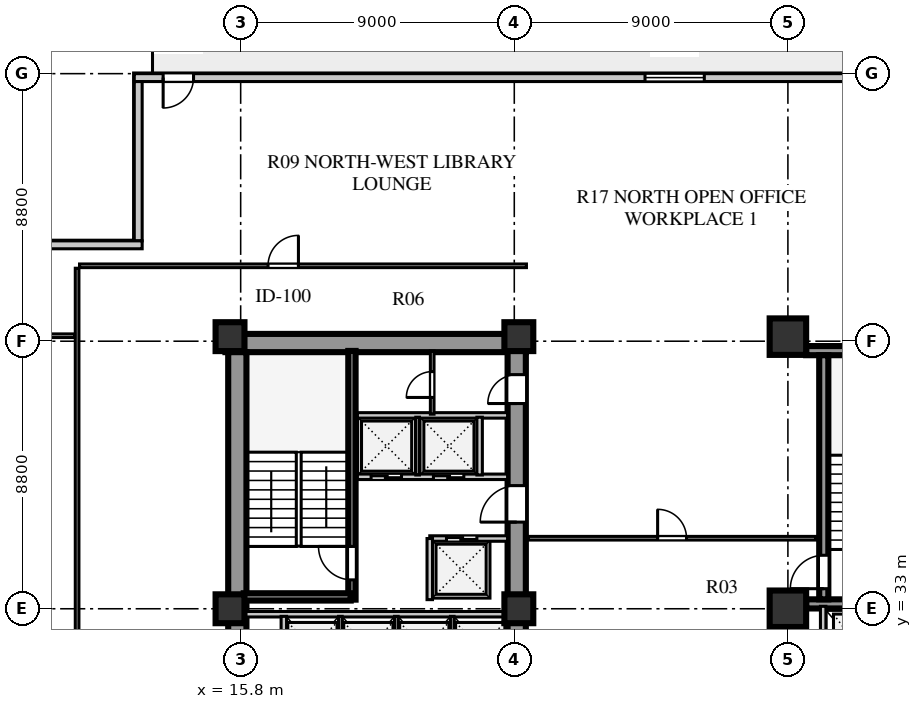
"""IFC4 building model, lengths in metres.
Left out: names, types, materials, properties, quantities, classifications, styles, units other than length and angle.
Written with IfcOpenShell. Run it as: python <this file> out.ifc"""

import sys

from ifc_helpers import new_model, si_unit, direction, frame, frame_2d, origin, origin_2d, place, context, subcontext, project, spatial, rectangle, extrude, element, fill, save


model = new_model("IFC4")
c1 = context("Model", 3, precision=1e-05, world=origin(), true_north=direction((0.0, 1.0)))
c2 = subcontext(c1, "Body", "Model", "MODEL_VIEW")
j1 = project(units=[si_unit("LENGTHUNIT", "METRE"), si_unit("PLANEANGLEUNIT", "RADIAN")], contexts=[c1])
p1 = place(None, origin())
s1 = spatial("IfcSite", under=j1, at=p1, CompositionType="ELEMENT")
p2 = place(p1, origin())
s2 = spatial("IfcBuilding", under=s1, at=p2, CompositionType="ELEMENT")
p3 = place(p2, frame((0.0, 0.0, 34.0)))
s3 = spatial("IfcBuildingStorey", under=s2, at=p3, CompositionType="ELEMENT", Elevation=34.0)
p4 = place(p3, frame((15.3, 41.74, 0.0), z_axis=(0.0, 0.0, 1.0), x_axis=(1.0, 0.0, 0.0)))
e1 = element("IfcWall", 1, at=p4, inside=s3, PredefinedType="SHEAR", context=c2, shape_type="SweptSolid", body=[
    extrude(rectangle(XDim=9.88, YDim=0.6, at=frame_2d((4.94, 0.0))), origin(), (0.0, 0.0, 1.0), 3.72),
])
p5 = place(p3, frame((15.69, 15.81, 0.0), z_axis=(0.0, 0.0, 1.0), x_axis=(0.0, 1.0, 0.0)))
e2 = element("IfcWall", 2, at=p5, inside=s3, PredefinedType="SHEAR", context=c2, shape_type="SweptSolid", body=[
    extrude(rectangle(XDim=25.63, YDim=0.6, at=frame_2d((12.815, 0.0))), origin(), (0.0, 0.0, 1.0), 3.72),
])
p6 = place(p3, frame((24.88, 15.74, 0.0), z_axis=(0.0, 0.0, 1.0), x_axis=(0.0, 1.0, 0.0)))
e3 = element("IfcWall", 3, at=p6, inside=s3, PredefinedType="SHEAR", context=c2, shape_type="SweptSolid", body=[
    extrude(rectangle(XDim=25.76, YDim=0.6, at=frame_2d((12.88, 0.0))), origin(), (0.0, 0.0, 1.0), 3.72),
])
p7 = place(p6, frame((1.61, 0.0, 0.0)))
e4 = element("IfcOpeningElement", 4, at=p7, cuts=e3, PredefinedType="OPENING", context=c2, shape_type="SweptSolid", body=[
    extrude(rectangle(XDim=1.2, YDim=2.1, at=frame_2d((0.6, 1.05))), frame((0.0, 0.31, 0.0), z_axis=(0.0, -1.0, 0.0), x_axis=(1.0, 0.0, 0.0)), (0.0, 0.0, 1.0), 0.62),
])
p8 = place(p6, frame((6.78, 0.0, 0.0)))
e5 = element("IfcOpeningElement", 5, at=p8, cuts=e3, PredefinedType="OPENING", context=c2, shape_type="SweptSolid", body=[
    extrude(rectangle(XDim=0.85, YDim=2.06, at=frame_2d((0.425, 1.03))), frame((0.0, 0.31, 0.0), z_axis=(0.0, -1.0, 0.0), x_axis=(1.0, 0.0, 0.0)), (0.0, 0.0, 1.0), 0.62),
])
p9 = place(p6, frame((12.11, 0.0, 0.0)))
e6 = element("IfcOpeningElement", 6, at=p9, cuts=e3, PredefinedType="OPENING", context=c2, shape_type="SweptSolid", body=[
    extrude(rectangle(XDim=1.5, YDim=2.12, at=frame_2d((0.75, 1.06))), frame((0.0, 0.31, 0.0), z_axis=(0.0, -1.0, 0.0), x_axis=(1.0, 0.0, 0.0)), (0.0, 0.0, 1.0), 0.62),
])
p10 = place(p6, frame((20.11, 0.0, 0.0)))
e7 = element("IfcOpeningElement", 7, at=p10, cuts=e3, PredefinedType="OPENING", context=c2, shape_type="SweptSolid", body=[
    extrude(rectangle(XDim=1.2, YDim=2.12, at=frame_2d((0.6, 1.06))), frame((0.0, 0.31, 0.0), z_axis=(0.0, -1.0, 0.0), x_axis=(1.0, 0.0, 0.0)), (0.0, 0.0, 1.0), 0.62),
])
p11 = place(p6, frame((24.01, 0.0, 0.0)))
e8 = element("IfcOpeningElement", 8, at=p11, cuts=e3, PredefinedType="OPENING", context=c2, shape_type="SweptSolid", body=[
    extrude(rectangle(XDim=0.95, YDim=2.1, at=frame_2d((0.475, 1.05))), frame((0.0, 0.31, 0.0), z_axis=(0.0, -1.0, 0.0), x_axis=(1.0, 0.0, 0.0)), (0.0, 0.0, 1.0), 0.62),
])
for number, where, z_axis, x_axis in (
    (9, (34.4, 33.16, 0.0), (0.0, 0.0, 1.0), (1.0, 0.0, 0.0)),
    (10, (34.4, 41.49, 0.0), (0.0, 0.0, 1.0), (1.0, 0.0, 0.0)),
):
    element("IfcWall", number, at=place(p3, frame(where, z_axis=z_axis, x_axis=x_axis)), inside=s3, PredefinedType="SHEAR", context=c2, shape_type="SweptSolid", body=[
        extrude(rectangle(XDim=4.47, YDim=0.3, at=frame_2d((2.235, 0.0))), origin(), (0.0, 0.0, 1.0), 3.72),
    ])
p12 = place(p3, frame((34.98, 33.31, 0.0), z_axis=(0.0, 0.0, 1.0), x_axis=(0.0, 1.0, 0.0)))
e11 = element("IfcWall", 11, at=p12, inside=s3, PredefinedType="SHEAR", context=c2, shape_type="SweptSolid", body=[
    extrude(rectangle(XDim=8.03, YDim=0.3, at=frame_2d((4.015, 0.0))), origin(), (0.0, 0.0, 1.0), 3.72),
])
p13 = place(p12, frame((0.35, 0.0, 0.0)))
e12 = element("IfcOpeningElement", 12, at=p13, cuts=e11, PredefinedType="OPENING", context=c2, shape_type="SweptSolid", body=[
    extrude(rectangle(XDim=1.1, YDim=2.1, at=frame_2d((0.55, 1.05))), frame((0.0, 0.16, 0.0), z_axis=(0.0, -1.0, 0.0), x_axis=(1.0, 0.0, 0.0)), (0.0, 0.0, 1.0), 0.32),
])
for number, where, z_axis, x_axis in (
    (13, (15.45, 33.0, 0.0), (0.0, 0.0, 1.0), (1.0, 0.0, 0.0)),
    (14, (15.45, 41.95, 0.0), (0.0, 0.0, 1.0), (1.0, 0.0, 0.0)),
    (15, (24.95, 33.0, 0.0), (0.0, 0.0, 1.0), (1.0, 0.0, 0.0)),
    (16, (24.95, 41.95, 0.0), (0.0, 0.0, 1.0), (1.0, 0.0, 0.0)),
):
    element("IfcColumn", number, at=place(p3, frame(where, z_axis=z_axis, x_axis=x_axis)), inside=s3, PredefinedType="COLUMN", context=c2, shape_type="SweptSolid", body=[
        extrude(rectangle(XDim=0.95, YDim=0.95, at=origin_2d()), origin(), (0.0, 0.0, 1.0), 3.72),
    ])
for number, where, z_axis, x_axis in (
    (17, (33.8, 33.0, 0.0), (0.0, 0.0, 1.0), (1.0, 0.0, 0.0)),
    (18, (33.8, 41.95, 0.0), (0.0, 0.0, 1.0), (1.0, 0.0, 0.0)),
):
    element("IfcColumn", number, at=place(p3, frame(where, z_axis=z_axis, x_axis=x_axis)), inside=s3, PredefinedType="COLUMN", context=c2, shape_type="SweptSolid", body=[
        extrude(rectangle(XDim=1.2, YDim=1.2, at=origin_2d()), origin(), (0.0, 0.0, 1.0), 3.72),
    ])
p14 = place(p3, frame((46.3, 50.47, 0.0), z_axis=(0.0, 0.0, 1.0), x_axis=(-1.0, 0.0, 0.0)))
e19 = element("IfcWall", 19, at=p14, inside=s3, PredefinedType="SOLIDWALL", context=c2, shape_type="SweptSolid", body=[
    extrude(rectangle(XDim=34.0, YDim=0.26, at=frame_2d((17.0, 0.0))), origin(), (0.0, 0.0, 1.0), 3.72),
])
p15 = place(p14, frame((32.05, 0.0, 0.0)))
e20 = element("IfcOpeningElement", 20, at=p15, cuts=e19, PredefinedType="OPENING", context=c2, shape_type="SweptSolid", body=[
    extrude(rectangle(XDim=1.0, YDim=2.05, at=frame_2d((0.5, 1.025))), frame((0.0, 0.14, 0.0), z_axis=(0.0, -1.0, 0.0), x_axis=(1.0, 0.0, 0.0)), (0.0, 0.0, 1.0), 0.28),
])
p16 = place(p14, frame((15.25, 0.0, 0.8)))
e21 = element("IfcOpeningElement", 21, at=p16, cuts=e19, PredefinedType="OPENING", context=c2, shape_type="SweptSolid", body=[
    extrude(rectangle(XDim=1.95, YDim=2.0, at=frame_2d((0.975, 1.0))), frame((0.0, 0.14, 0.0), z_axis=(0.0, -1.0, 0.0), x_axis=(1.0, 0.0, 0.0)), (0.0, 0.0, 1.0), 0.28),
])
p17 = place(p3, frame((12.43, 50.34, 0.0), z_axis=(0.0, 0.0, 1.0), x_axis=(0.0, -1.0, 0.0)))
e22 = element("IfcWall", 22, at=p17, inside=s3, PredefinedType="SOLIDWALL", context=c2, shape_type="SweptSolid", body=[
    extrude(rectangle(XDim=5.24, YDim=0.26, at=frame_2d((2.62, 0.0))), origin(), (0.0, 0.0, 1.0), 3.72),
])
p18 = place(p3, frame((12.56, 44.97, 0.0), z_axis=(0.0, 0.0, 1.0), x_axis=(-1.0, 0.0, 0.0)))
e23 = element("IfcWall", 23, at=p18, inside=s3, PredefinedType="SOLIDWALL", context=c2, shape_type="SweptSolid", body=[
    extrude(rectangle(XDim=5.76, YDim=0.26, at=frame_2d((2.88, 0.0))), origin(), (0.0, 0.0, 1.0), 3.72),
])
p19 = place(p3, frame((15.9, 32.82, 0.0), z_axis=(0.0, 0.0, 1.0), x_axis=(1.0, 0.0, 0.0)))
e24 = element("IfcWall", 24, at=p19, inside=s3, PredefinedType="SOLIDWALL", context=c2, shape_type="SweptSolid", body=[
    extrude(rectangle(XDim=8.68, YDim=0.18, at=frame_2d((4.34, 0.0))), origin(), (0.0, 0.0, 1.0), 3.02),
])
p20 = place(p3, frame((17.22, 30.7, 0.0), z_axis=(0.0, 0.0, 1.0), x_axis=(0.0, 1.0, 0.0)))
e25 = element("IfcWall", 25, at=p20, inside=s3, PredefinedType="SOLIDWALL", context=c2, shape_type="SweptSolid", body=[
    extrude(rectangle(XDim=2.05, YDim=0.18, at=frame_2d((1.025, 0.0))), origin(), (0.0, 0.0, 1.0), 3.72),
])
for number, where, z_axis, x_axis in (
    (26, (19.08, 30.7, 0.0), (0.0, 0.0, 1.0), (0.0, 1.0, 0.0)),
    (27, (20.92, 30.7, 0.0), (0.0, 0.0, 1.0), (0.0, 1.0, 0.0)),
    (28, (22.76, 30.7, 0.0), (0.0, 0.0, 1.0), (0.0, 1.0, 0.0)),
):
    element("IfcWall", number, at=place(p3, frame(where, z_axis=z_axis, x_axis=x_axis)), inside=s3, PredefinedType="PARTITIONING", context=c2, shape_type="SweptSolid", body=[
        extrude(rectangle(XDim=2.05, YDim=0.12, at=frame_2d((1.025, 0.0))), origin(), (0.0, 0.0, 1.0), 3.72),
    ])
p21 = place(p3, frame((19.46, 33.3, 0.0), z_axis=(0.0, 0.0, 1.0), x_axis=(0.0, 1.0, 0.0)))
e29 = element("IfcWall", 29, at=p21, inside=s3, PredefinedType="SHEAR", context=c2, shape_type="SweptSolid", body=[
    extrude(rectangle(XDim=8.18, YDim=0.24, at=frame_2d((4.09, 0.0))), origin(), (0.0, 0.0, 1.0), 4.0),
])
p22 = place(p21, frame((0.65, 0.0, 0.0)))
e30 = element("IfcOpeningElement", 30, at=p22, cuts=e29, PredefinedType="OPENING", context=c2, shape_type="SweptSolid", body=[
    extrude(rectangle(XDim=1.1, YDim=2.1, at=frame_2d((0.55, 1.05))), frame((0.0, 0.13, 0.0), z_axis=(0.0, -1.0, 0.0), x_axis=(1.0, 0.0, 0.0)), (0.0, 0.0, 1.0), 0.26),
])
p23 = place(p3, frame((15.9, 33.39, 0.0), z_axis=(0.0, 0.0, 1.0), x_axis=(1.0, 0.0, 0.0)))
e31 = element("IfcWall", 31, at=p23, inside=s3, PredefinedType="SHEAR", context=c2, shape_type="SweptSolid", body=[
    extrude(rectangle(XDim=3.52, YDim=0.24, at=frame_2d((1.76, 0.0))), origin(), (0.0, 0.0, 1.0), 4.0),
])
p24 = place(p3, frame((22.02, 35.31, 0.0), z_axis=(0.0, 0.0, 1.0), x_axis=(1.0, 0.0, 0.0)))
e32 = element("IfcWall", 32, at=p24, inside=s3, PredefinedType="SOLIDWALL", context=c2, shape_type="SweptSolid", body=[
    extrude(rectangle(XDim=2.56, YDim=0.18, at=frame_2d((1.28, 0.0))), origin(), (0.0, 0.0, 1.0), 3.72),
])
p25 = place(p24, frame((0.55, 0.0, 0.0)))
e33 = element("IfcOpeningElement", 33, at=p25, cuts=e32, PredefinedType="OPENING", context=c2, shape_type="SweptSolid", body=[
    extrude(rectangle(XDim=1.0, YDim=2.1, at=frame_2d((0.5, 1.05))), frame((0.0, 0.1, 0.0), z_axis=(0.0, -1.0, 0.0), x_axis=(1.0, 0.0, 0.0)), (0.0, 0.0, 1.0), 0.2),
])
p26 = place(p3, frame((22.02, 33.3, 0.0), z_axis=(0.0, 0.0, 1.0), x_axis=(0.0, 1.0, 0.0)))
e34 = element("IfcWall", 34, at=p26, inside=s3, PredefinedType="SOLIDWALL", context=c2, shape_type="SweptSolid", body=[
    extrude(rectangle(XDim=2.01, YDim=0.18, at=frame_2d((1.005, 0.0))), origin(), (0.0, 0.0, 1.0), 3.72),
])
p27 = place(p3, frame((19.64, 37.34, 0.0), z_axis=(0.0, 0.0, 1.0), x_axis=(1.0, 0.0, 0.0)))
e35 = element("IfcWall", 35, at=p27, inside=s3, PredefinedType="SOLIDWALL", context=c2, shape_type="SweptSolid", body=[
    extrude(rectangle(XDim=4.94, YDim=0.18, at=frame_2d((2.47, 0.0))), origin(), (0.0, 0.0, 1.0), 3.72),
])
p28 = place(p27, frame((0.45, 0.0, 0.0)))
e36 = element("IfcOpeningElement", 36, at=p28, cuts=e35, PredefinedType="OPENING", context=c2, shape_type="SweptSolid", body=[
    extrude(rectangle(XDim=1.0, YDim=2.1, at=frame_2d((0.5, 1.05))), frame((0.0, 0.1, 0.0), z_axis=(0.0, -1.0, 0.0), x_axis=(1.0, 0.0, 0.0)), (0.0, 0.0, 1.0), 0.2),
])
p29 = place(p27, frame((2.5, 0.0, 0.0)))
e37 = element("IfcOpeningElement", 37, at=p29, cuts=e35, PredefinedType="OPENING", context=c2, shape_type="SweptSolid", body=[
    extrude(rectangle(XDim=1.0, YDim=2.1, at=frame_2d((0.5, 1.05))), frame((0.0, 0.1, 0.0), z_axis=(0.0, -1.0, 0.0), x_axis=(1.0, 0.0, 0.0)), (0.0, 0.0, 1.0), 0.2),
])
p30 = place(p3, frame((19.64, 39.36, 0.0), z_axis=(0.0, 0.0, 1.0), x_axis=(1.0, 0.0, 0.0)))
e38 = element("IfcWall", 38, at=p30, inside=s3, PredefinedType="SOLIDWALL", context=c2, shape_type="SweptSolid", body=[
    extrude(rectangle(XDim=4.94, YDim=0.18, at=frame_2d((2.47, 0.0))), origin(), (0.0, 0.0, 1.0), 3.72),
])
p31 = place(p3, frame((21.62, 37.4, 0.0), z_axis=(0.0, 0.0, 1.0), x_axis=(0.0, 1.0, 0.0)))
e39 = element("IfcWall", 39, at=p31, inside=s3, PredefinedType="PARTITIONING", context=c2, shape_type="SweptSolid", body=[
    extrude(rectangle(XDim=1.9, YDim=0.12, at=frame_2d((0.95, 0.0))), origin(), (0.0, 0.0, 1.0), 3.72),
])
p32 = place(p3, frame((23.66, 37.4, 0.0), z_axis=(0.0, 0.0, 1.0), x_axis=(0.0, 1.0, 0.0)))
e40 = element("IfcWall", 40, at=p32, inside=s3, PredefinedType="SOLIDWALL", context=c2, shape_type="SweptSolid", body=[
    extrude(rectangle(XDim=1.9, YDim=0.18, at=frame_2d((0.95, 0.0))), origin(), (0.0, 0.0, 1.0), 3.72),
])
p33 = place(p3, frame((22.1, 39.4, 0.0), z_axis=(0.0, 0.0, 1.0), x_axis=(0.0, 1.0, 0.0)))
e41 = element("IfcWall", 41, at=p33, inside=s3, PredefinedType="PARTITIONING", context=c2, shape_type="SweptSolid", body=[
    extrude(rectangle(XDim=2.08, YDim=0.12, at=frame_2d((1.04, 0.0))), origin(), (0.0, 0.0, 1.0), 3.72),
])
p34 = place(p33, frame((0.55, 0.0, 0.0)))
e42 = element("IfcOpeningElement", 42, at=p34, cuts=e41, PredefinedType="OPENING", context=c2, shape_type="SweptSolid", body=[
    extrude(rectangle(XDim=0.85, YDim=2.06, at=frame_2d((0.425, 1.03))), frame((0.0, 0.07, 0.0), z_axis=(0.0, -1.0, 0.0), x_axis=(1.0, 0.0, 0.0)), (0.0, 0.0, 1.0), 0.14),
])
p35 = place(p3, frame((34.96, 28.86, 0.0), z_axis=(0.0, 0.0, 1.0), x_axis=(0.0, 1.0, 0.0)))
e43 = element("IfcWall", 43, at=p35, inside=s3, PredefinedType="SOLIDWALL", context=c2, shape_type="SweptSolid", body=[
    extrude(rectangle(XDim=4.22, YDim=0.18, at=frame_2d((2.11, 0.0))), origin(), (0.0, 0.0, 1.0), 3.72),
])
p36 = place(p3, frame((25.25, 35.32, 0.0), z_axis=(0.0, 0.0, 1.0), x_axis=(1.0, 0.0, 0.0)))
e44 = element("IfcWall", 44, at=p36, inside=s3, PredefinedType="PARTITIONING", context=c2, shape_type="SweptSolid", body=[
    extrude(rectangle(XDim=9.47, YDim=0.12, at=frame_2d((4.735, 0.0))), origin(), (0.0, 0.0, 1.0), 3.72),
])
p37 = place(p36, frame((4.265, 0.0, 0.0)))
e45 = element("IfcOpeningElement", 45, at=p37, cuts=e44, PredefinedType="OPENING", context=c2, shape_type="SweptSolid", body=[
    extrude(rectangle(XDim=0.95, YDim=2.08, at=frame_2d((0.475, 1.04))), frame((0.0, 0.07, 0.0), z_axis=(0.0, -1.0, 0.0), x_axis=(1.0, 0.0, 0.0)), (0.0, 0.0, 1.0), 0.14),
])
p38 = place(p3, frame((10.42, 13.0, 0.0), z_axis=(0.0, 0.0, 1.0), x_axis=(0.0, 1.0, 0.0)))
e46 = element("IfcWall", 46, at=p38, inside=s3, PredefinedType="PARTITIONING", context=c2, shape_type="SweptSolid", body=[
    extrude(rectangle(XDim=31.2, YDim=0.12, at=frame_2d((15.6, 0.0))), origin(), (0.0, 0.0, 1.0), 3.72),
])
p39 = place(p38, frame((15.15, 0.0, 0.0)))
e47 = element("IfcOpeningElement", 47, at=p39, cuts=e46, PredefinedType="OPENING", context=c2, shape_type="SweptSolid", body=[
    extrude(rectangle(XDim=0.95, YDim=2.08, at=frame_2d((0.475, 1.04))), frame((0.0, 0.07, 0.0), z_axis=(0.0, -1.0, 0.0), x_axis=(1.0, 0.0, 0.0)), (0.0, 0.0, 1.0), 0.14),
])
p40 = place(p3, frame((7.08, 41.98, 0.0), z_axis=(0.0, 0.0, 1.0), x_axis=(1.0, 0.0, 0.0)))
e48 = element("IfcWall", 48, at=p40, inside=s3, PredefinedType="PARTITIONING", context=c2, shape_type="SweptSolid", body=[
    extrude(rectangle(XDim=3.26, YDim=0.12, at=frame_2d((1.63, 0.0))), origin(), (0.0, 0.0, 1.0), 3.22),
])
p41 = place(p3, frame((10.5, 44.28, 0.0), z_axis=(0.0, 0.0, 1.0), x_axis=(1.0, 0.0, 0.0)))
e49 = element("IfcWall", 49, at=p41, inside=s3, PredefinedType="PARTITIONING", context=c2, shape_type="SweptSolid", body=[
    extrude(rectangle(XDim=14.7, YDim=0.12, at=frame_2d((7.35, 0.0))), origin(), (0.0, 0.0, 1.0), 3.72),
])
p42 = place(p41, frame((6.2, 0.0, 0.0)))
e50 = element("IfcOpeningElement", 50, at=p42, cuts=e49, PredefinedType="OPENING", context=c2, shape_type="SweptSolid", body=[
    extrude(rectangle(XDim=1.0, YDim=2.08, at=frame_2d((0.5, 1.04))), frame((0.0, 0.07, 0.0), z_axis=(0.0, -1.0, 0.0), x_axis=(1.0, 0.0, 0.0)), (0.0, 0.0, 1.0), 0.14),
])
p43 = place(p15, frame((1.0, 0.0, 0.0), z_axis=(0.0, 0.0, 1.0), x_axis=(-1.0, 0.0, 0.0)))
e51 = element("IfcDoor", 51, at=p43, inside=s3, OperationType="SINGLE_SWING_LEFT", PredefinedType="DOOR", context=c2, shape_type="SweptSolid", body=[
    extrude(rectangle(XDim=1.0, YDim=2.05, at=frame_2d((0.5, 1.025))), frame((0.0, 0.025, 0.0), z_axis=(0.0, -1.0, 0.0), x_axis=(1.0, 0.0, 0.0)), (0.0, 0.0, 1.0), 0.05),
])
fill(e20, e51)
p44 = place(p16, origin())
e52 = element("IfcWindow", 52, at=p44, inside=s3, PartitioningType="SINGLE_PANEL", PredefinedType="WINDOW", context=c2, shape_type="SweptSolid", body=[
    extrude(rectangle(XDim=1.95, YDim=2.0, at=frame_2d((0.975, 1.0))), frame((0.0, 0.03, 0.0), z_axis=(0.0, -1.0, 0.0), x_axis=(1.0, 0.0, 0.0)), (0.0, 0.0, 1.0), 0.06),
])
fill(e21, e52)
p45 = place(p22, origin())
e53 = element("IfcDoor", 53, at=p45, inside=s3, OperationType="SINGLE_SWING_RIGHT", PredefinedType="DOOR", context=c2, shape_type="SweptSolid", body=[
    extrude(rectangle(XDim=1.1, YDim=2.1, at=frame_2d((0.55, 1.05))), frame((0.0, 0.025, 0.0), z_axis=(0.0, -1.0, 0.0), x_axis=(1.0, 0.0, 0.0)), (0.0, 0.0, 1.0), 0.05),
])
fill(e30, e53)
p46 = place(p10, frame((1.2, 0.0, 0.0), z_axis=(0.0, 0.0, 1.0), x_axis=(-1.0, 0.0, 0.0)))
e54 = element("IfcDoor", 54, at=p46, inside=s3, OperationType="SINGLE_SWING_RIGHT", PredefinedType="DOOR", context=c2, shape_type="SweptSolid", body=[
    extrude(rectangle(XDim=1.2, YDim=2.12, at=frame_2d((0.6, 1.06))), frame((0.0, 0.025, 0.0), z_axis=(0.0, -1.0, 0.0), x_axis=(1.0, 0.0, 0.0)), (0.0, 0.0, 1.0), 0.05),
])
fill(e7, e54)
p47 = place(p28, frame((1.0, 0.0, 0.0), z_axis=(0.0, 0.0, 1.0), x_axis=(-1.0, 0.0, 0.0)))
e55 = element("IfcDoor", 55, at=p47, inside=s3, OperationType="DOUBLE_DOOR_SLIDING", PredefinedType="DOOR", context=c2, shape_type="SweptSolid", body=[
    extrude(rectangle(XDim=1.0, YDim=2.1, at=frame_2d((0.5, 1.05))), frame((0.0, 0.025, 0.0), z_axis=(0.0, -1.0, 0.0), x_axis=(1.0, 0.0, 0.0)), (0.0, 0.0, 1.0), 0.05),
])
fill(e36, e55)
p48 = place(p29, frame((1.0, 0.0, 0.0), z_axis=(0.0, 0.0, 1.0), x_axis=(-1.0, 0.0, 0.0)))
e56 = element("IfcDoor", 56, at=p48, inside=s3, OperationType="DOUBLE_DOOR_SLIDING", PredefinedType="DOOR", context=c2, shape_type="SweptSolid", body=[
    extrude(rectangle(XDim=1.0, YDim=2.1, at=frame_2d((0.5, 1.05))), frame((0.0, 0.025, 0.0), z_axis=(0.0, -1.0, 0.0), x_axis=(1.0, 0.0, 0.0)), (0.0, 0.0, 1.0), 0.05),
])
fill(e37, e56)
p49 = place(p25, origin())
e57 = element("IfcDoor", 57, at=p49, inside=s3, OperationType="DOUBLE_DOOR_SLIDING", PredefinedType="DOOR", context=c2, shape_type="SweptSolid", body=[
    extrude(rectangle(XDim=1.0, YDim=2.1, at=frame_2d((0.5, 1.05))), frame((0.0, 0.025, 0.0), z_axis=(0.0, -1.0, 0.0), x_axis=(1.0, 0.0, 0.0)), (0.0, 0.0, 1.0), 0.05),
])
fill(e33, e57)
p50 = place(p34, origin())
e58 = element("IfcDoor", 58, at=p50, inside=s3, OperationType="SINGLE_SWING_LEFT", PredefinedType="DOOR", context=c2, shape_type="SweptSolid", body=[
    extrude(rectangle(XDim=0.85, YDim=2.06, at=frame_2d((0.425, 1.03))), frame((0.0, 0.025, 0.0), z_axis=(0.0, -1.0, 0.0), x_axis=(1.0, 0.0, 0.0)), (0.0, 0.0, 1.0), 0.05),
])
fill(e42, e58)
p51 = place(p11, frame((0.95, 0.0, 0.0), z_axis=(0.0, 0.0, 1.0), x_axis=(-1.0, 0.0, 0.0)))
e59 = element("IfcDoor", 59, at=p51, inside=s3, OperationType="SINGLE_SWING_RIGHT", PredefinedType="DOOR", context=c2, shape_type="SweptSolid", body=[
    extrude(rectangle(XDim=0.95, YDim=2.1, at=frame_2d((0.475, 1.05))), frame((0.0, 0.025, 0.0), z_axis=(0.0, -1.0, 0.0), x_axis=(1.0, 0.0, 0.0)), (0.0, 0.0, 1.0), 0.05),
])
fill(e8, e59)
p52 = place(p13, origin())
e60 = element("IfcDoor", 60, at=p52, inside=s3, OperationType="SINGLE_SWING_LEFT", PredefinedType="DOOR", context=c2, shape_type="SweptSolid", body=[
    extrude(rectangle(XDim=1.1, YDim=2.1, at=frame_2d((0.55, 1.05))), frame((0.0, 0.025, 0.0), z_axis=(0.0, -1.0, 0.0), x_axis=(1.0, 0.0, 0.0)), (0.0, 0.0, 1.0), 0.05),
])
fill(e12, e60)
p53 = place(p42, origin())
e61 = element("IfcDoor", 61, at=p53, inside=s3, OperationType="SINGLE_SWING_RIGHT", PredefinedType="DOOR", context=c2, shape_type="SweptSolid", body=[
    extrude(rectangle(XDim=1.0, YDim=2.08, at=frame_2d((0.5, 1.04))), frame((0.0, 0.025, 0.0), z_axis=(0.0, -1.0, 0.0), x_axis=(1.0, 0.0, 0.0)), (0.0, 0.0, 1.0), 0.05),
])
fill(e50, e61)
p54 = place(p37, origin())
e62 = element("IfcDoor", 62, at=p54, inside=s3, OperationType="SINGLE_SWING_LEFT", PredefinedType="DOOR", context=c2, shape_type="SweptSolid", body=[
    extrude(rectangle(XDim=0.95, YDim=2.08, at=frame_2d((0.475, 1.04))), frame((0.0, 0.025, 0.0), z_axis=(0.0, -1.0, 0.0), x_axis=(1.0, 0.0, 0.0)), (0.0, 0.0, 1.0), 0.05),
])
fill(e45, e62)
save(model, sys.argv[1])
